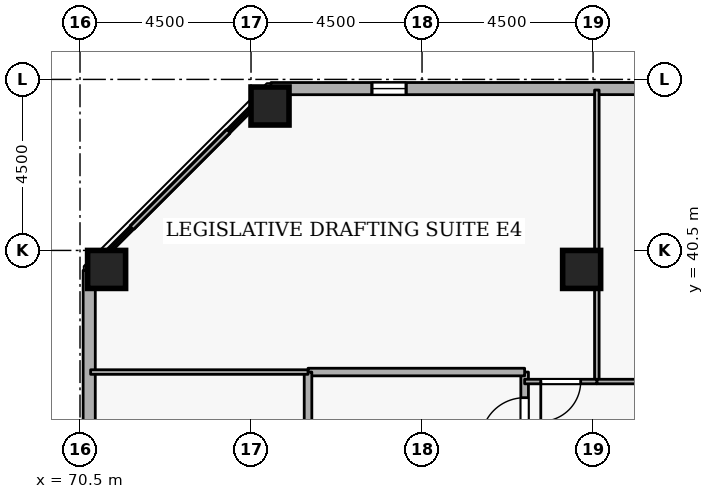
"""IFC4 building model, lengths in metres.
Left out: names, types, materials, properties, quantities, classifications, styles, units other than length and angle.
Written with IfcOpenShell. Run it as: python <this file> out.ifc"""

import sys

from ifc_helpers import new_model, si_unit, direction, frame, frame_2d, origin, origin_2d, place, context, subcontext, project, spatial, rectangle, extrude, element, fill, save


model = new_model("IFC4")
c1 = context("Model", 3, precision=1e-05, world=origin(), true_north=direction((0.0, 1.0)))
c2 = subcontext(c1, "Body", "Model", "MODEL_VIEW")
j1 = project(units=[si_unit("LENGTHUNIT", "METRE"), si_unit("PLANEANGLEUNIT", "RADIAN")], contexts=[c1])
p1 = place(None, origin())
s1 = spatial("IfcSite", under=j1, at=p1, CompositionType="ELEMENT")
p2 = place(p1, origin())
s2 = spatial("IfcBuilding", under=s1, at=p2, CompositionType="ELEMENT")
p3 = place(p2, frame((0.0, 0.0, 247.5)))
s3 = spatial("IfcBuildingStorey", under=s2, at=p3, CompositionType="ELEMENT", Elevation=247.5)
for number, where, z_axis, x_axis in (
    (1, (75.5, 44.3, 0.0), (0.0, 0.0, 1.0), (1.0, 0.0, 0.0)),
    (2, (71.2, 40.0, 0.0), (0.0, 0.0, 1.0), (1.0, 0.0, 0.0)),
    (3, (83.7, 40.0, 0.0), (0.0, 0.0, 1.0), (1.0, 0.0, 0.0)),
):
    element("IfcColumn", number, at=place(p3, frame(where, z_axis=z_axis, x_axis=x_axis)), inside=s3, PredefinedType="COLUMN", context=c2, shape_type="SweptSolid", body=[
        extrude(rectangle(XDim=1.0, YDim=1.0, at=origin_2d()), origin(), (0.0, 0.0, 1.0), 3.6),
    ])
p4 = place(p3, frame((109.681, 44.765, 0.0), z_axis=(0.0, 0.0, 1.0), x_axis=(-0.99999997701, -0.000214431216, 0.0)))
e4 = element("IfcWall", 4, at=p4, inside=s3, PredefinedType="STANDARD", context=c2, shape_type="SweptSolid", body=[
    extrude(rectangle(XDim=34.156, YDim=0.32, at=frame_2d((17.078, 0.0))), origin(), (0.0, 0.0, 1.0), 2.7),
])
p5 = place(p4, frame((1.8, 0.0, 0.72)))
e5 = element("IfcOpeningElement", 5, at=p5, cuts=e4, PredefinedType="OPENING", context=c2, shape_type="SweptSolid", body=[
    extrude(rectangle(XDim=0.9, YDim=1.75, at=frame_2d((0.45, 0.875))), frame((0.0, 0.17, 0.0), z_axis=(0.0, -1.0, 0.0), x_axis=(1.0, 0.0, 0.0)), (0.0, 0.0, 1.0), 0.34),
])
p6 = place(p4, frame((11.4, 0.0, 0.72)))
e6 = element("IfcOpeningElement", 6, at=p6, cuts=e4, PredefinedType="OPENING", context=c2, shape_type="SweptSolid", body=[
    extrude(rectangle(XDim=0.9, YDim=1.75, at=frame_2d((0.45, 0.875))), frame((0.0, 0.17, 0.0), z_axis=(0.0, -1.0, 0.0), x_axis=(1.0, 0.0, 0.0)), (0.0, 0.0, 1.0), 0.34),
])
p7 = place(p4, frame((16.2, 0.0, 0.72)))
e7 = element("IfcOpeningElement", 7, at=p7, cuts=e4, PredefinedType="OPENING", context=c2, shape_type="SweptSolid", body=[
    extrude(rectangle(XDim=0.9, YDim=1.75, at=frame_2d((0.45, 0.875))), frame((0.0, 0.17, 0.0), z_axis=(0.0, -1.0, 0.0), x_axis=(1.0, 0.0, 0.0)), (0.0, 0.0, 1.0), 0.34),
])
p8 = place(p4, frame((30.6, 0.0, 0.72)))
e8 = element("IfcOpeningElement", 8, at=p8, cuts=e4, PredefinedType="OPENING", context=c2, shape_type="SweptSolid", body=[
    extrude(rectangle(XDim=0.9, YDim=1.75, at=frame_2d((0.45, 0.875))), frame((0.0, 0.17, 0.0), z_axis=(0.0, -1.0, 0.0), x_axis=(1.0, 0.0, 0.0)), (0.0, 0.0, 1.0), 0.34),
])
p9 = place(p3, frame((70.743, 39.975, 0.0), z_axis=(0.0, 0.0, 1.0), x_axis=(-0.000214431216, -0.99999997701, 0.0)))
e9 = element("IfcWall", 9, at=p9, inside=s3, PredefinedType="STANDARD", context=c2, shape_type="SweptSolid", body=[
    extrude(rectangle(XDim=34.156, YDim=0.32, at=frame_2d((17.078, 0.0))), origin(), (0.0, 0.0, 1.0), 2.7),
])
p10 = place(p9, frame((6.6, 0.0, 0.72)))
e10 = element("IfcOpeningElement", 10, at=p10, cuts=e9, PredefinedType="OPENING", context=c2, shape_type="SweptSolid", body=[
    extrude(rectangle(XDim=0.9, YDim=1.75, at=frame_2d((0.45, 0.875))), frame((0.0, 0.17, 0.0), z_axis=(0.0, -1.0, 0.0), x_axis=(1.0, 0.0, 0.0)), (0.0, 0.0, 1.0), 0.34),
])
p11 = place(p9, frame((16.2, 0.0, 0.72)))
e11 = element("IfcOpeningElement", 11, at=p11, cuts=e9, PredefinedType="OPENING", context=c2, shape_type="SweptSolid", body=[
    extrude(rectangle(XDim=0.9, YDim=1.75, at=frame_2d((0.45, 0.875))), frame((0.0, 0.17, 0.0), z_axis=(0.0, -1.0, 0.0), x_axis=(1.0, 0.0, 0.0)), (0.0, 0.0, 1.0), 0.34),
])
p12 = place(p9, frame((21.0, 0.0, 0.72)))
e12 = element("IfcOpeningElement", 12, at=p12, cuts=e9, PredefinedType="OPENING", context=c2, shape_type="SweptSolid", body=[
    extrude(rectangle(XDim=0.9, YDim=1.75, at=frame_2d((0.45, 0.875))), frame((0.0, 0.17, 0.0), z_axis=(0.0, -1.0, 0.0), x_axis=(1.0, 0.0, 0.0)), (0.0, 0.0, 1.0), 0.34),
])
p13 = place(p9, frame((30.6, 0.0, 0.72)))
e13 = element("IfcOpeningElement", 13, at=p13, cuts=e9, PredefinedType="OPENING", context=c2, shape_type="SweptSolid", body=[
    extrude(rectangle(XDim=0.9, YDim=1.75, at=frame_2d((0.45, 0.875))), frame((0.0, 0.17, 0.0), z_axis=(0.0, -1.0, 0.0), x_axis=(1.0, 0.0, 0.0)), (0.0, 0.0, 1.0), 0.34),
])
p14 = place(p3, frame((82.2, 34.8, 0.0), z_axis=(0.0, 0.0, 1.0), x_axis=(0.0, 1.0, 0.0)))
e14 = element("IfcWall", 14, at=p14, inside=s3, PredefinedType="STANDARD", context=c2, shape_type="SweptSolid", body=[
    extrude(rectangle(XDim=2.5, YDim=0.2, at=frame_2d((1.25, 0.0))), origin(), (0.0, 0.0, 1.0), 3.34),
])
p15 = place(p14, frame((0.675, 0.0, 0.0)))
e15 = element("IfcOpeningElement", 15, at=p15, cuts=e14, PredefinedType="OPENING", context=c2, shape_type="SweptSolid", body=[
    extrude(rectangle(XDim=1.15, YDim=2.1, at=frame_2d((0.575, 1.05))), frame((0.0, 0.11, 0.0), z_axis=(0.0, -1.0, 0.0), x_axis=(1.0, 0.0, 0.0)), (0.0, 0.0, 1.0), 0.22),
])
p16 = place(p3, frame((82.2, 37.3, 0.0), z_axis=(0.0, 0.0, 1.0), x_axis=(-1.0, 0.0, 0.0)))
e16 = element("IfcWall", 16, at=p16, inside=s3, PredefinedType="STANDARD", context=c2, shape_type="SweptSolid", body=[
    extrude(rectangle(XDim=5.7, YDim=0.2, at=frame_2d((2.85, 0.0))), origin(), (0.0, 0.0, 1.0), 3.34),
])
p17 = place(p3, frame((76.5, 37.3, 0.0), z_axis=(0.0, 0.0, 1.0), x_axis=(0.0, -1.0, 0.0)))
e17 = element("IfcWall", 17, at=p17, inside=s3, PredefinedType="STANDARD", context=c2, shape_type="SweptSolid", body=[
    extrude(rectangle(XDim=2.5, YDim=0.2, at=frame_2d((1.25, 0.0))), origin(), (0.0, 0.0, 1.0), 3.34),
])
p18 = place(p3, frame((84.1, 37.05, 0.0), z_axis=(0.0, 0.0, 1.0), x_axis=(0.0, 1.0, 0.0)))
e18 = element("IfcWall", 18, at=p18, inside=s3, PredefinedType="PARTITIONING", context=c2, shape_type="SweptSolid", body=[
    extrude(rectangle(XDim=7.67, YDim=0.12, at=frame_2d((3.835, 0.0))), origin(), (0.0, 0.0, 1.0), 3.34),
])
p19 = place(p3, frame((88.9, 37.05, 0.0), z_axis=(0.0, 0.0, 1.0), x_axis=(-1.0, 0.0, 0.0)))
e19 = element("IfcWall", 19, at=p19, inside=s3, PredefinedType="PARTITIONING", context=c2, shape_type="SweptSolid", body=[
    extrude(rectangle(XDim=4.8, YDim=0.12, at=frame_2d((2.4, 0.0))), origin(), (0.0, 0.0, 1.0), 3.34),
])
p20 = place(p19, frame((1.925, 0.0, 0.0)))
e20 = element("IfcOpeningElement", 20, at=p20, cuts=e19, PredefinedType="OPENING", context=c2, shape_type="SweptSolid", body=[
    extrude(rectangle(XDim=0.95, YDim=2.1, at=frame_2d((0.475, 1.05))), frame((0.0, 0.07, 0.0), z_axis=(0.0, -1.0, 0.0), x_axis=(1.0, 0.0, 0.0)), (0.0, 0.0, 1.0), 0.14),
])
p21 = place(p3, frame((76.5, 37.3, 0.0), z_axis=(0.0, 0.0, 1.0), x_axis=(-1.0, 0.0, 0.0)))
e21 = element("IfcWall", 21, at=p21, inside=s3, PredefinedType="PARTITIONING", context=c2, shape_type="SweptSolid", body=[
    extrude(rectangle(XDim=5.72, YDim=0.12, at=frame_2d((2.86, 0.0))), origin(), (0.0, 0.0, 1.0), 3.34),
])
p22 = place(p3, frame((70.78, 40.01, 0.0), z_axis=(0.0, 0.0, 1.0), x_axis=(0.707106781187, 0.707106781187, 0.0)))
e22 = element("IfcWall", 22, at=p22, inside=s3, PredefinedType="PARTITIONING", context=c2, shape_type="SweptSolid", body=[
    extrude(rectangle(XDim=6.066, YDim=0.12, at=frame_2d((3.033, 0.0))), origin(), (0.0, 0.0, 1.0), 3.34),
])
p23 = place(p3, frame((84.1, 37.05, 0.0), z_axis=(0.0, 0.0, 1.0), x_axis=(-1.0, 0.0, 0.0)))
e23 = element("IfcWall", 23, at=p23, inside=s3, PredefinedType="PARTITIONING", context=c2, shape_type="SweptSolid", body=[
    extrude(rectangle(XDim=1.9, YDim=0.12, at=frame_2d((0.95, 0.0))), origin(), (0.0, 0.0, 1.0), 3.34),
])
p24 = place(p23, frame((0.425, 0.0, 0.0)))
e24 = element("IfcOpeningElement", 24, at=p24, cuts=e23, PredefinedType="OPENING", context=c2, shape_type="SweptSolid", body=[
    extrude(rectangle(XDim=1.05, YDim=2.1, at=frame_2d((0.525, 1.05))), frame((0.0, 0.07, 0.0), z_axis=(0.0, -1.0, 0.0), x_axis=(1.0, 0.0, 0.0)), (0.0, 0.0, 1.0), 0.14),
])
p25 = place(p8, origin())
e25 = element("IfcWindow", 25, at=p25, inside=s3, PartitioningType="SINGLE_PANEL", PredefinedType="WINDOW", context=c2, shape_type="SweptSolid", body=[
    extrude(rectangle(XDim=0.9, YDim=1.75, at=frame_2d((0.45, 0.875))), frame((0.0, 0.03, 0.0), z_axis=(0.0, -1.0, 0.0), x_axis=(1.0, 0.0, 0.0)), (0.0, 0.0, 1.0), 0.06),
])
fill(e8, e25)
p26 = place(p15, origin())
e26 = element("IfcDoor", 26, at=p26, inside=s3, OperationType="SINGLE_SWING_LEFT", PredefinedType="DOOR", context=c2, shape_type="SweptSolid", body=[
    extrude(rectangle(XDim=1.15, YDim=2.1, at=frame_2d((0.575, 1.05))), frame((0.0, 0.025, 0.0), z_axis=(0.0, -1.0, 0.0), x_axis=(1.0, 0.0, 0.0)), (0.0, 0.0, 1.0), 0.05),
])
fill(e15, e26)
p27 = place(p24, origin())
e27 = element("IfcDoor", 27, at=p27, inside=s3, OperationType="SINGLE_SWING_RIGHT", PredefinedType="DOOR", context=c2, shape_type="SweptSolid", body=[
    extrude(rectangle(XDim=1.05, YDim=2.1, at=frame_2d((0.525, 1.05))), frame((0.0, 0.025, 0.0), z_axis=(0.0, -1.0, 0.0), x_axis=(1.0, 0.0, 0.0)), (0.0, 0.0, 1.0), 0.05),
])
fill(e24, e27)
save(model, sys.argv[1])
